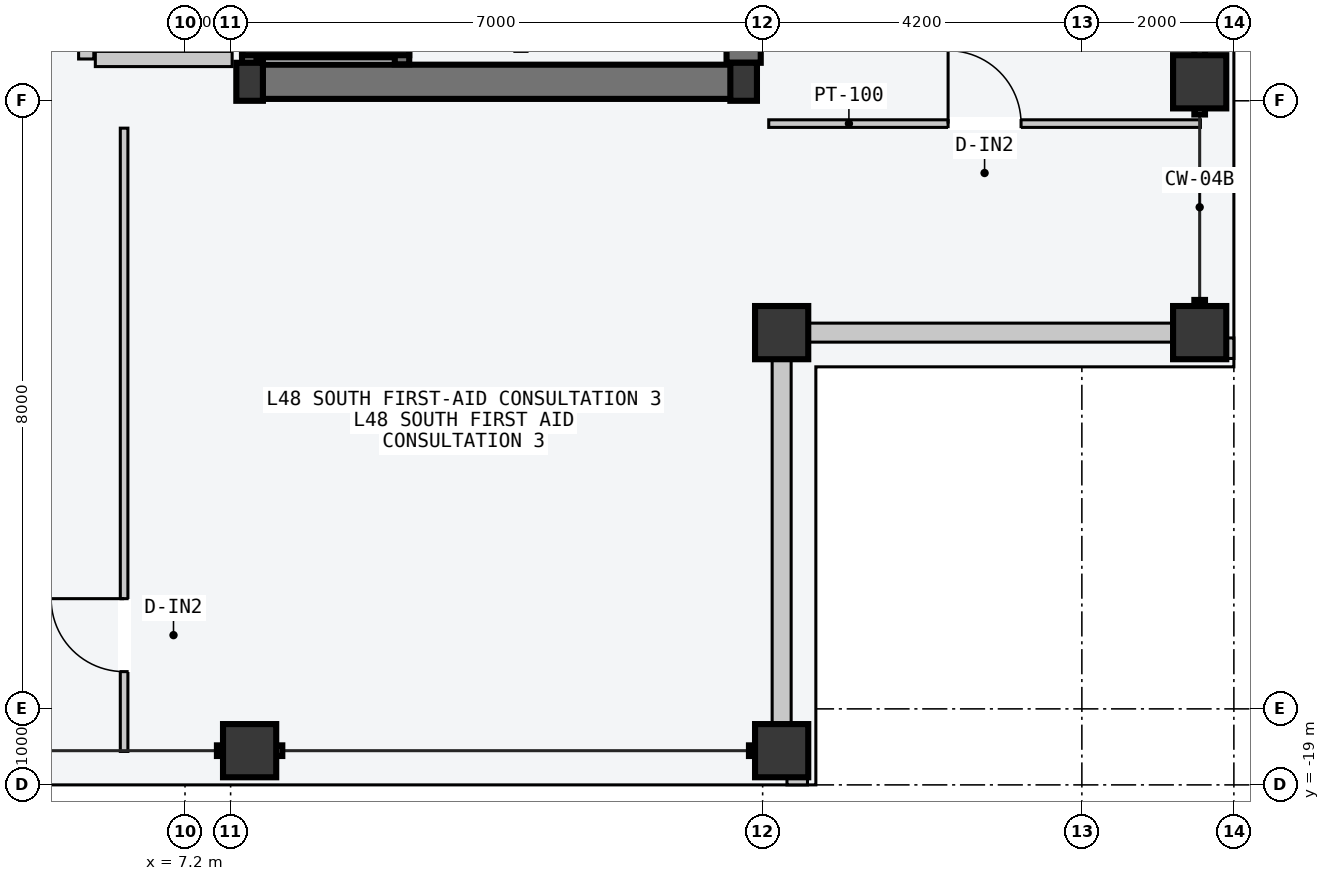
"""IFC4 building model, lengths in metres.
Left out: names, types, materials, properties, quantities, classifications, styles, units other than length and angle.
Written with IfcOpenShell. Run it as: python <this file> out.ifc"""

import sys

from ifc_helpers import new_model, si_unit, direction, frame, frame_2d, origin, origin_2d, place, context, subcontext, project, spatial, rectangle, hollow_rectangle, i_section, extrude, element, fill, save


model = new_model("IFC4")
c1 = context("Model", 3, precision=1e-05, world=origin(), true_north=direction((0.0, 1.0)))
c2 = subcontext(c1, "Body", "Model", "MODEL_VIEW")
j1 = project(units=[si_unit("LENGTHUNIT", "METRE"), si_unit("PLANEANGLEUNIT", "RADIAN")], contexts=[c1])
p1 = place(None, origin())
s1 = spatial("IfcSite", under=j1, at=p1, CompositionType="ELEMENT")
p2 = place(p1, origin())
s2 = spatial("IfcBuilding", under=s1, at=p2, CompositionType="ELEMENT")
p3 = place(p2, frame((0.0, 0.0, 183.9)))
s3 = spatial("IfcBuildingStorey", under=s2, at=p3, CompositionType="ELEMENT", Elevation=183.9)
p4 = place(p3, frame((8.07, -9.75, -0.2), z_axis=(0.0, 0.0, 1.0), x_axis=(1.0, 0.0, 0.0)))
e1 = element("IfcWall", 1, at=p4, inside=s3, PredefinedType="SHEAR", context=c2, shape_type="SweptSolid", body=[
    extrude(rectangle(XDim=6.46, YDim=0.45, at=frame_2d((3.23, 0.0))), origin(), (0.0, 0.0, 1.0), 3.6),
])
p5 = place(p3, frame((14.55, -9.5, -0.2), z_axis=(0.0, 0.0, 1.0), x_axis=(0.0, 1.0, 0.0)))
e2 = element("IfcWall", 2, at=p5, inside=s3, PredefinedType="SHEAR", context=c2, shape_type="SweptSolid", body=[
    extrude(rectangle(XDim=9.25, YDim=0.45, at=frame_2d((4.625, 0.0))), origin(), (0.0, 0.0, 1.0), 3.6),
])
for number, where, z_axis, x_axis in (
    (3, (8.05, -9.75, 0.0), (0.0, 0.0, 1.0), (1.0, 0.0, 0.0)),
    (4, (14.55, -9.75, 0.0), (0.0, 0.0, 1.0), (1.0, 0.0, 0.0)),
):
    element("IfcColumn", number, at=place(p3, frame(where, z_axis=z_axis, x_axis=x_axis)), inside=s3, PredefinedType="COLUMN", context=c2, shape_type="SweptSolid", body=[
        extrude(i_section(OverallWidth=0.35, OverallDepth=0.5, WebThickness=0.02, FlangeThickness=0.032, at=origin_2d()), origin(), (0.0, 0.0, 1.0), 3.6),
    ])
for number, where, z_axis, x_axis in (
    (5, (8.05, -18.55, 0.0), (0.0, 0.0, 1.0), (1.0, 0.0, 0.0)),
    (6, (15.05, -18.55, 0.0), (0.0, 0.0, 1.0), (1.0, 0.0, 0.0)),
    (7, (20.55, -13.05, 0.0), (0.0, 0.0, 1.0), (0.0, 1.0, 0.0)),
    (8, (20.55, -9.75, 0.0), (0.0, 0.0, 1.0), (0.0, 1.0, 0.0)),
    (9, (15.05, -13.05, 0.0), (0.0, 0.0, 1.0), (1.0, 0.0, 0.0)),
):
    element("IfcColumn", number, at=place(p3, frame(where, z_axis=z_axis, x_axis=x_axis)), inside=s3, PredefinedType="COLUMN", context=c2, shape_type="SweptSolid", body=[
        extrude(hollow_rectangle(XDim=0.7, YDim=0.7, WallThickness=0.03, at=origin_2d()), origin(), (0.0, 0.0, 1.0), 3.6),
    ])
for number, where, z_axis, x_axis in (
    (10, (15.41, -13.05, 0.0), (0.0, 0.0, 1.0), (1.0, 0.0, 0.0)),
    (11, (15.05, -18.19, 0.0), (0.0, 0.0, 1.0), (0.0, 1.0, 0.0)),
):
    element("IfcWall", number, at=place(p3, frame(where, z_axis=z_axis, x_axis=x_axis)), inside=s3, PredefinedType="STANDARD", context=c2, shape_type="SweptSolid", body=[
        extrude(rectangle(XDim=4.78, YDim=0.25, at=frame_2d((2.39, 0.0))), origin(), (0.0, 0.0, 1.0), 2.75),
    ])
for number, where, z_axis, x_axis in (
    (12, (15.12, -18.89, 0.0), (0.0, 0.0, 1.0), (1.0, 0.0, 0.0)),
    (13, (20.89, -13.39, 0.0), (0.0, 0.0, 1.0), (0.0, 1.0, 0.0)),
):
    element("IfcWall", number, at=place(p3, frame(where, z_axis=z_axis, x_axis=x_axis)), inside=s3, PredefinedType="PARAPET", context=c2, shape_type="SweptSolid", body=[
        extrude(rectangle(XDim=0.27, YDim=0.22, at=frame_2d((0.135, 0.0))), origin(), (0.0, 0.0, 1.0), 1.2),
    ])
p6 = place(p3, frame((8.045, -9.52, -0.2), z_axis=(0.0, 0.0, 1.0), x_axis=(0.0, 1.0, 0.0)))
e14 = element("IfcWall", 14, at=p6, inside=s3, PredefinedType="SOLIDWALL", context=c2, shape_type="SweptSolid", body=[
    extrude(rectangle(XDim=2.12, YDim=0.19, at=frame_2d((1.06, 0.0))), origin(), (0.0, 0.0, 1.0), 3.6),
])
p7 = place(p6, frame((0.57, 0.0, 0.2)))
e15 = element("IfcOpeningElement", 15, at=p7, cuts=e14, PredefinedType="OPENING", context=c2, shape_type="SweptSolid", body=[
    extrude(rectangle(XDim=1.1, YDim=2.2, at=frame_2d((0.55, 1.1))), frame((0.0, 0.105, 0.0), z_axis=(0.0, -1.0, 0.0), x_axis=(1.0, 0.0, 0.0)), (0.0, 0.0, 1.0), 0.21),
])
p8 = place(p3, frame((10.055, -9.52, -0.2), z_axis=(0.0, 0.0, 1.0), x_axis=(0.0, 1.0, 0.0)))
e16 = element("IfcWall", 16, at=p8, inside=s3, PredefinedType="SOLIDWALL", context=c2, shape_type="SweptSolid", body=[
    extrude(rectangle(XDim=2.12, YDim=0.19, at=frame_2d((1.06, 0.0))), origin(), (0.0, 0.0, 1.0), 3.6),
])
p9 = place(p3, frame((7.95, -9.305, -0.2), z_axis=(0.0, 0.0, 1.0), x_axis=(1.0, 0.0, 0.0)))
e17 = element("IfcWall", 17, at=p9, inside=s3, PredefinedType="SOLIDWALL", context=c2, shape_type="SweptSolid", body=[
    extrude(rectangle(XDim=2.2, YDim=0.19, at=frame_2d((1.1, 0.0))), origin(), (0.0, 0.0, 1.0), 3.6),
])
p10 = place(p3, frame((5.9, -9.45, 0.0), z_axis=(0.0, 0.0, 1.0), x_axis=(0.0, 1.0, 0.0)))
e18 = element("IfcWall", 18, at=p10, inside=s3, PredefinedType="PARTITIONING", context=c2, shape_type="SweptSolid", body=[
    extrude(rectangle(XDim=10.5, YDim=0.2, at=frame_2d((5.25, 0.0))), origin(), (0.0, 0.0, 1.0), 3.4),
])
p11 = place(p10, frame((3.9, 0.0, 0.0)))
e19 = element("IfcOpeningElement", 19, at=p11, cuts=e18, PredefinedType="OPENING", context=c2, shape_type="SweptSolid", body=[
    extrude(rectangle(XDim=1.5, YDim=2.2, at=frame_2d((0.75, 1.1))), frame((0.0, 0.11, 0.0), z_axis=(0.0, -1.0, 0.0), x_axis=(1.0, 0.0, 0.0)), (0.0, 0.0, 1.0), 0.22),
])
p12 = place(p3, frame((6.02, -9.45, 0.0), z_axis=(0.0, 0.0, 1.0), x_axis=(1.0, 0.0, 0.0)))
e20 = element("IfcWall", 20, at=p12, inside=s3, PredefinedType="PARTITIONING", context=c2, shape_type="SweptSolid", body=[
    extrude(rectangle(XDim=1.8, YDim=0.2, at=frame_2d((0.9, 0.0))), origin(), (0.0, 0.0, 1.0), 3.4),
])
p13 = place(p3, frame((6.399, -18.56, 0.0), z_axis=(0.0, 0.0, 1.0), x_axis=(0.0, 1.0, 0.0)))
e21 = element("IfcWall", 21, at=p13, inside=s3, PredefinedType="PARTITIONING", context=c2, shape_type="SweptSolid", body=[
    extrude(rectangle(XDim=8.2, YDim=0.1, at=frame_2d((4.1, 0.0))), origin(), (0.0, 0.0, 1.0), 3.4),
])
p14 = place(p13, frame((1.05, 0.0, 0.0)))
e22 = element("IfcOpeningElement", 22, at=p14, cuts=e21, PredefinedType="OPENING", context=c2, shape_type="SweptSolid", body=[
    extrude(rectangle(XDim=0.96, YDim=2.18, at=frame_2d((0.48, 1.09))), frame((0.0, 0.06, 0.0), z_axis=(0.0, -1.0, 0.0), x_axis=(1.0, 0.0, 0.0)), (0.0, 0.0, 1.0), 0.12),
])
p15 = place(p3, frame((14.88, -10.3, 0.0), z_axis=(0.0, 0.0, 1.0), x_axis=(1.0, 0.0, 0.0)))
e23 = element("IfcWall", 23, at=p15, inside=s3, PredefinedType="PARTITIONING", context=c2, shape_type="SweptSolid", body=[
    extrude(rectangle(XDim=5.68, YDim=0.1, at=frame_2d((2.84, 0.0))), origin(), (0.0, 0.0, 1.0), 3.4),
])
p16 = place(p15, frame((2.36, 0.0, 0.0)))
e24 = element("IfcOpeningElement", 24, at=p16, cuts=e23, PredefinedType="OPENING", context=c2, shape_type="SweptSolid", body=[
    extrude(rectangle(XDim=0.96, YDim=2.18, at=frame_2d((0.48, 1.09))), frame((0.0, 0.06, 0.0), z_axis=(0.0, -1.0, 0.0), x_axis=(1.0, 0.0, 0.0)), (0.0, 0.0, 1.0), 0.12),
])
p17 = place(p14, origin())
e25 = element("IfcDoor", 25, at=p17, inside=s3, OperationType="SINGLE_SWING_RIGHT", PredefinedType="DOOR", context=c2, shape_type="SweptSolid", body=[
    extrude(rectangle(XDim=0.96, YDim=2.18, at=frame_2d((0.48, 1.09))), frame((0.0, 0.025, 0.0), z_axis=(0.0, -1.0, 0.0), x_axis=(1.0, 0.0, 0.0)), (0.0, 0.0, 1.0), 0.05),
])
fill(e22, e25)
p18 = place(p16, origin())
e26 = element("IfcDoor", 26, at=p18, inside=s3, OperationType="SINGLE_SWING_LEFT", PredefinedType="DOOR", context=c2, shape_type="SweptSolid", body=[
    extrude(rectangle(XDim=0.96, YDim=2.18, at=frame_2d((0.48, 1.09))), frame((0.0, 0.025, 0.0), z_axis=(0.0, -1.0, 0.0), x_axis=(1.0, 0.0, 0.0)), (0.0, 0.0, 1.0), 0.05),
])
fill(e24, e26)
save(model, sys.argv[1])
